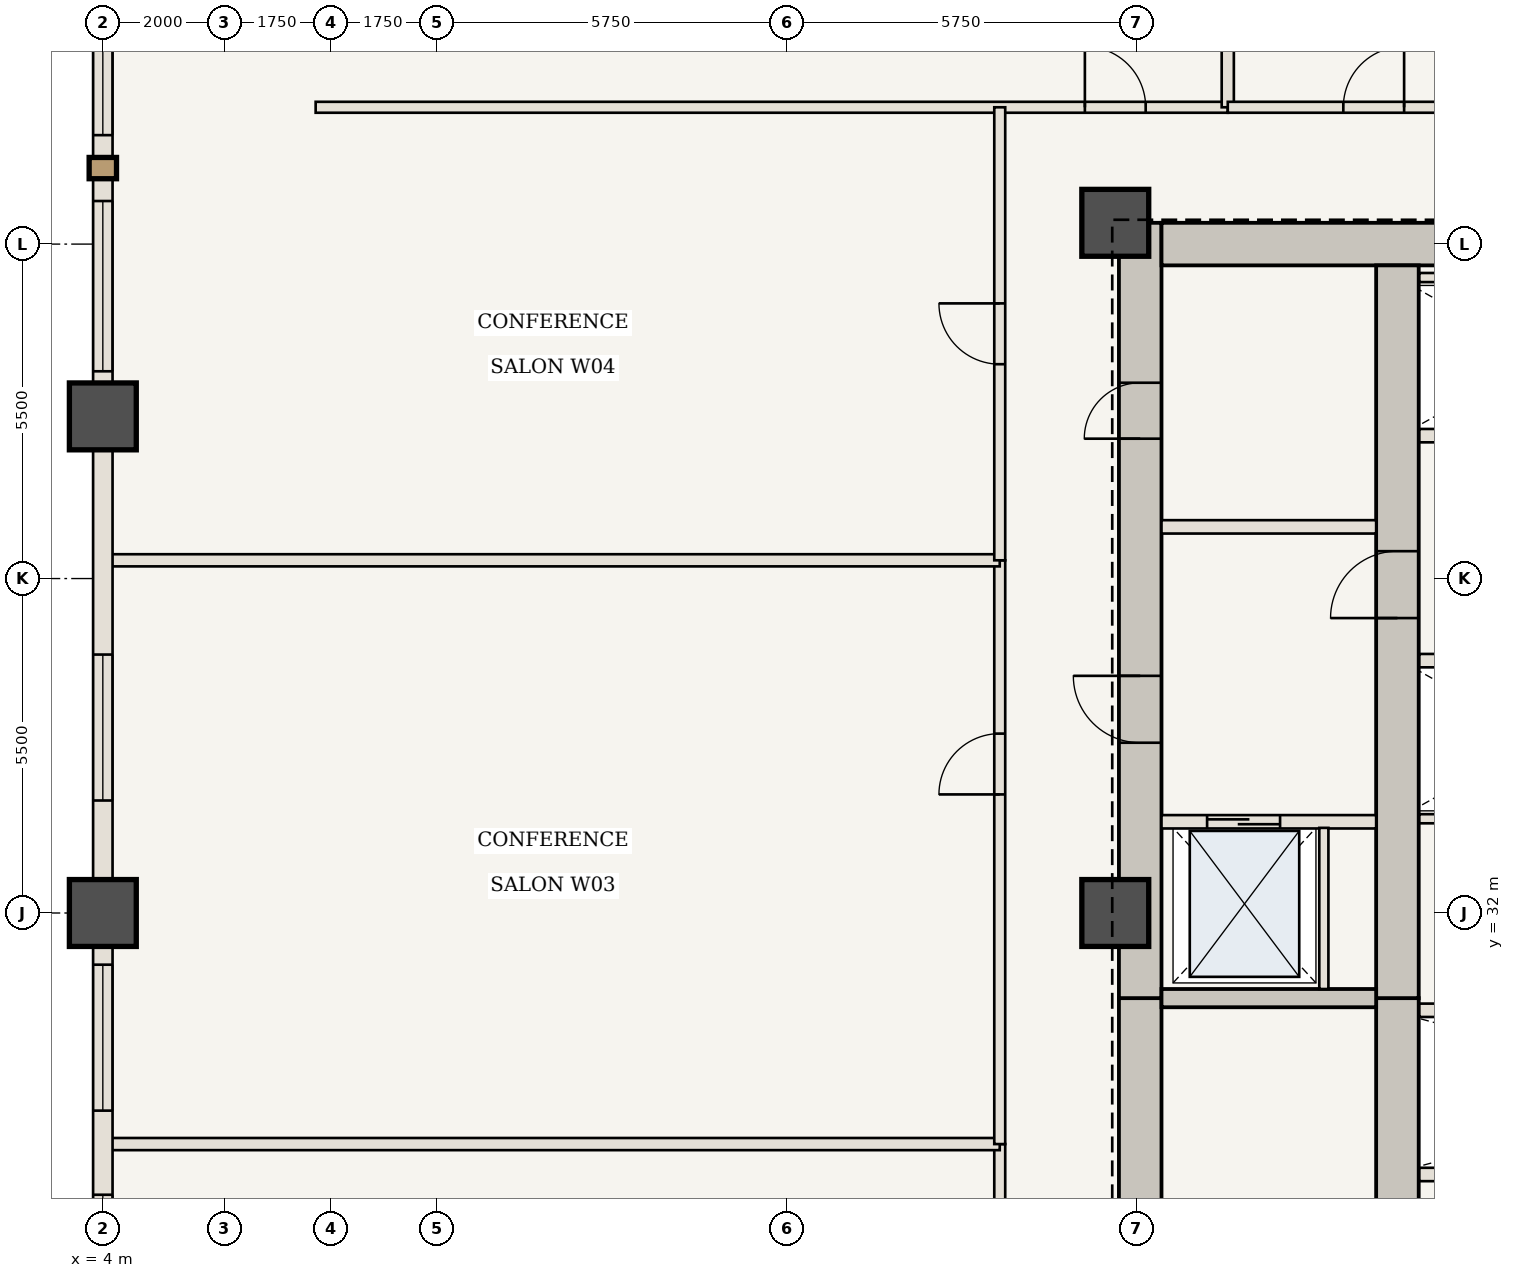
"""IFC4 building model, lengths in metres.
Left out: names, types, materials, properties, quantities, classifications, styles, units other than length and angle.
Written with IfcOpenShell. Run it as: python <this file> out.ifc"""

import sys

from ifc_helpers import new_model, si_unit, direction, frame, frame_2d, origin, origin_2d, place, context, subcontext, project, spatial, rectangle, extrude, element, fill, save


model = new_model("IFC4")
c1 = context("Model", 3, precision=1e-05, world=origin(), true_north=direction((0.0, 1.0)))
c2 = subcontext(c1, "Body", "Model", "MODEL_VIEW")
j1 = project(units=[si_unit("LENGTHUNIT", "METRE"), si_unit("PLANEANGLEUNIT", "RADIAN")], contexts=[c1])
p1 = place(None, origin())
s1 = spatial("IfcSite", under=j1, at=p1, CompositionType="ELEMENT")
p2 = place(p1, origin())
s2 = spatial("IfcBuilding", under=s1, at=p2, CompositionType="ELEMENT")
p3 = place(p2, frame((0.0, 0.0, 82.25)))
s3 = spatial("IfcBuildingStorey", under=s2, at=p3, CompositionType="ELEMENT", Elevation=82.25)
p4 = place(p3, frame((21.06, 20.6, 0.0), z_axis=(0.0, 0.0, 1.0), x_axis=(0.0, 1.0, 0.0)))
e1 = element("IfcWall", 1, at=p4, inside=s3, PredefinedType="SHEAR", context=c2, shape_type="SweptSolid", body=[
    extrude(rectangle(XDim=10.0, YDim=0.7, at=frame_2d((5.0, 0.0))), origin(), (0.0, 0.0, 1.0), 3.5),
])
p5 = place(p4, frame((1.15, 0.0, 0.0)))
e2 = element("IfcOpeningElement", 2, at=p5, cuts=e1, PredefinedType="OPENING", context=c2, shape_type="SweptSolid", body=[
    extrude(rectangle(XDim=1.15, YDim=2.15, at=frame_2d((0.575, 1.075))), frame((0.0, 0.36, 0.0), z_axis=(0.0, -1.0, 0.0), x_axis=(1.0, 0.0, 0.0)), (0.0, 0.0, 1.0), 0.72),
])
p6 = place(p3, frame((21.06, 30.6, 0.0), z_axis=(0.0, 0.0, 1.0), x_axis=(0.0, 1.0, 0.0)))
e3 = element("IfcWall", 3, at=p6, inside=s3, PredefinedType="SHEAR", context=c2, shape_type="SweptSolid", body=[
    extrude(rectangle(XDim=12.75, YDim=0.7, at=frame_2d((6.375, 0.0))), origin(), (0.0, 0.0, 1.0), 3.5),
])
p7 = place(p6, frame((4.2, 0.0, 0.0)))
e4 = element("IfcOpeningElement", 4, at=p7, cuts=e3, PredefinedType="OPENING", context=c2, shape_type="SweptSolid", body=[
    extrude(rectangle(XDim=1.1, YDim=2.15, at=frame_2d((0.55, 1.075))), frame((0.0, 0.36, 0.0), z_axis=(0.0, -1.0, 0.0), x_axis=(1.0, 0.0, 0.0)), (0.0, 0.0, 1.0), 0.72),
])
p8 = place(p6, frame((9.2, 0.0, 0.0)))
e5 = element("IfcOpeningElement", 5, at=p8, cuts=e3, PredefinedType="OPENING", context=c2, shape_type="SweptSolid", body=[
    extrude(rectangle(XDim=0.92, YDim=2.1, at=frame_2d((0.46, 1.05))), frame((0.0, 0.36, 0.0), z_axis=(0.0, -1.0, 0.0), x_axis=(1.0, 0.0, 0.0)), (0.0, 0.0, 1.0), 0.72),
])
p9 = place(p3, frame((21.41, 43.0, 0.0), z_axis=(0.0, 0.0, 1.0), x_axis=(1.0, 0.0, 0.0)))
e6 = element("IfcWall", 6, at=p9, inside=s3, PredefinedType="SHEAR", context=c2, shape_type="SweptSolid", body=[
    extrude(rectangle(XDim=8.24, YDim=0.7, at=frame_2d((4.12, 0.0))), origin(), (0.0, 0.0, 1.0), 3.5),
])
p10 = place(p3, frame((25.29, 21.3, 0.0), z_axis=(0.0, 0.0, 1.0), x_axis=(0.0, 1.0, 0.0)))
e7 = element("IfcWall", 7, at=p10, inside=s3, PredefinedType="SHEAR", context=c2, shape_type="SweptSolid", body=[
    extrude(rectangle(XDim=9.3, YDim=0.7, at=frame_2d((4.65, 0.0))), origin(), (0.0, 0.0, 1.0), 3.5),
])
p11 = place(p3, frame((25.29, 30.6, 0.0), z_axis=(0.0, 0.0, 1.0), x_axis=(0.0, 1.0, 0.0)))
e8 = element("IfcWall", 8, at=p11, inside=s3, PredefinedType="SHEAR", context=c2, shape_type="SweptSolid", body=[
    extrude(rectangle(XDim=12.05, YDim=0.7, at=frame_2d((6.025, 0.0))), origin(), (0.0, 0.0, 1.0), 3.5),
])
p12 = place(p11, frame((6.25, 0.0, 0.0)))
e9 = element("IfcOpeningElement", 9, at=p12, cuts=e8, PredefinedType="OPENING", context=c2, shape_type="SweptSolid", body=[
    extrude(rectangle(XDim=1.1, YDim=2.15, at=frame_2d((0.55, 1.075))), frame((0.0, 0.36, 0.0), z_axis=(0.0, -1.0, 0.0), x_axis=(1.0, 0.0, 0.0)), (0.0, 0.0, 1.0), 0.72),
])
for number, where, z_axis, x_axis in (
    (10, (20.65, 43.35, 0.0), (0.0, 0.0, 1.0), (1.0, 0.0, 0.0)),
    (11, (20.65, 32.0, 0.0), (0.0, 0.0, 1.0), (1.0, 0.0, 0.0)),
    (12, (4.0, 32.0, 0.0), (0.0, 0.0, 1.0), (1.0, 0.0, 0.0)),
    (13, (4.0, 40.167, 0.0), (0.0, 0.0, 1.0), (1.0, 0.0, 0.0)),
):
    element("IfcColumn", number, at=place(p3, frame(where, z_axis=z_axis, x_axis=x_axis)), inside=s3, PredefinedType="COLUMN", context=c2, shape_type="SweptSolid", body=[
        extrude(rectangle(XDim=1.1, YDim=1.1, at=origin_2d()), origin(), (0.0, 0.0, 1.0), 3.5),
    ])
p13 = place(p3, frame((21.41, 30.6, 0.0), z_axis=(0.0, 0.0, 1.0), x_axis=(1.0, 0.0, 0.0)))
e14 = element("IfcWall", 14, at=p13, inside=s3, PredefinedType="SHEAR", context=c2, shape_type="SweptSolid", body=[
    extrude(rectangle(XDim=3.53, YDim=0.3, at=frame_2d((1.765, 0.0))), origin(), (0.0, 0.0, 1.0), 3.32),
])
p14 = place(p3, frame((21.41, 33.5, 0.0), z_axis=(0.0, 0.0, 1.0), x_axis=(1.0, 0.0, 0.0)))
e15 = element("IfcWall", 15, at=p14, inside=s3, PredefinedType="STANDARD", context=c2, shape_type="SweptSolid", body=[
    extrude(rectangle(XDim=3.53, YDim=0.22, at=frame_2d((1.765, 0.0))), origin(), (0.0, 0.0, 1.0), 3.32),
])
p15 = place(p14, frame((0.75, 0.0, 0.0)))
e16 = element("IfcOpeningElement", 16, at=p15, cuts=e15, PredefinedType="OPENING", context=c2, shape_type="SweptSolid", body=[
    extrude(rectangle(XDim=1.2, YDim=2.2, at=frame_2d((0.6, 1.1))), frame((0.0, 0.12, 0.0), z_axis=(0.0, -1.0, 0.0), x_axis=(1.0, 0.0, 0.0)), (0.0, 0.0, 1.0), 0.24),
])
p16 = place(p3, frame((24.08, 30.75, 0.0), z_axis=(0.0, 0.0, 1.0), x_axis=(0.0, 1.0, 0.0)))
e17 = element("IfcWall", 17, at=p16, inside=s3, PredefinedType="STANDARD", context=c2, shape_type="SweptSolid", body=[
    extrude(rectangle(XDim=2.65, YDim=0.15, at=frame_2d((1.325, 0.0))), origin(), (0.0, 0.0, 1.0), 3.32),
])
p17 = place(p3, frame((21.41, 38.35, 0.0), z_axis=(0.0, 0.0, 1.0), x_axis=(1.0, 0.0, 0.0)))
e18 = element("IfcWall", 18, at=p17, inside=s3, PredefinedType="STANDARD", context=c2, shape_type="SweptSolid", body=[
    extrude(rectangle(XDim=3.53, YDim=0.22, at=frame_2d((1.765, 0.0))), origin(), (0.0, 0.0, 1.0), 3.32),
])
for number, where, z_axis, x_axis in (
    (19, (25.65, 27.7, 0.0), (0.0, 0.0, 1.0), (1.0, 0.0, 0.0)),
    (20, (25.65, 30.4, 0.0), (0.0, 0.0, 1.0), (1.0, 0.0, 0.0)),
):
    element("IfcWall", number, at=place(p3, frame(where, z_axis=z_axis, x_axis=x_axis)), inside=s3, PredefinedType="STANDARD", context=c2, shape_type="SweptSolid", body=[
        extrude(rectangle(XDim=9.25, YDim=0.22, at=frame_2d((4.625, 0.0))), origin(), (0.0, 0.0, 1.0), 3.32),
    ])
p18 = place(p3, frame((25.65, 36.15, 0.0), z_axis=(0.0, 0.0, 1.0), x_axis=(1.0, 0.0, 0.0)))
e21 = element("IfcWall", 21, at=p18, inside=s3, PredefinedType="STANDARD", context=c2, shape_type="SweptSolid", body=[
    extrude(rectangle(XDim=4.3, YDim=0.22, at=frame_2d((2.15, 0.0))), origin(), (0.0, 0.0, 1.0), 3.32),
])
p19 = place(p3, frame((25.65, 33.55, 0.0), z_axis=(0.0, 0.0, 1.0), x_axis=(1.0, 0.0, 0.0)))
e22 = element("IfcWall", 22, at=p19, inside=s3, PredefinedType="STANDARD", context=c2, shape_type="SweptSolid", body=[
    extrude(rectangle(XDim=4.2, YDim=0.15, at=frame_2d((2.1, 0.0))), origin(), (0.0, 0.0, 1.0), 3.32),
])
p20 = place(p3, frame((25.65, 39.85, 0.0), z_axis=(0.0, 0.0, 1.0), x_axis=(1.0, 0.0, 0.0)))
e23 = element("IfcWall", 23, at=p20, inside=s3, PredefinedType="STANDARD", context=c2, shape_type="SweptSolid", body=[
    extrude(rectangle(XDim=4.3, YDim=0.22, at=frame_2d((2.15, 0.0))), origin(), (0.0, 0.0, 1.0), 3.32),
])
p21 = place(p3, frame((25.65, 42.45, 0.0), z_axis=(0.0, 0.0, 1.0), x_axis=(1.0, 0.0, 0.0)))
e24 = element("IfcWall", 24, at=p21, inside=s3, PredefinedType="STANDARD", context=c2, shape_type="SweptSolid", body=[
    extrude(rectangle(XDim=4.2, YDim=0.15, at=frame_2d((2.1, 0.0))), origin(), (0.0, 0.0, 1.0), 3.32),
])
p22 = place(p3, frame((7.5, 45.25, 0.0), z_axis=(0.0, 0.0, 1.0), x_axis=(1.0, 0.0, 0.0)))
e25 = element("IfcWall", 25, at=p22, inside=s3, PredefinedType="STANDARD", context=c2, shape_type="SweptSolid", body=[
    extrude(rectangle(XDim=15.0, YDim=0.18, at=frame_2d((7.5, 0.0))), origin(), (0.0, 0.0, 1.0), 3.32),
])
p23 = place(p22, frame((12.65, 0.0, 0.0)))
e26 = element("IfcOpeningElement", 26, at=p23, cuts=e25, PredefinedType="OPENING", context=c2, shape_type="SweptSolid", body=[
    extrude(rectangle(XDim=1.0, YDim=2.15, at=frame_2d((0.5, 1.075))), frame((0.0, 0.1, 0.0), z_axis=(0.0, -1.0, 0.0), x_axis=(1.0, 0.0, 0.0)), (0.0, 0.0, 1.0), 0.2),
])
p24 = place(p3, frame((22.5, 45.25, 0.0), z_axis=(0.0, 0.0, 1.0), x_axis=(0.0, 1.0, 0.0)))
e27 = element("IfcWall", 27, at=p24, inside=s3, PredefinedType="STANDARD", context=c2, shape_type="SweptSolid", body=[
    extrude(rectangle(XDim=14.69, YDim=0.2, at=frame_2d((7.345, 0.0))), origin(), (0.0, 0.0, 1.0), 3.32),
])
p25 = place(p3, frame((22.5, 45.25, 0.0), z_axis=(0.0, 0.0, 1.0), x_axis=(1.0, 0.0, 0.0)))
e28 = element("IfcWall", 28, at=p25, inside=s3, PredefinedType="STANDARD", context=c2, shape_type="SweptSolid", body=[
    extrude(rectangle(XDim=4.8, YDim=0.18, at=frame_2d((2.4, 0.0))), origin(), (0.0, 0.0, 1.0), 3.32),
])
p26 = place(p25, frame((1.9, 0.0, 0.0)))
e29 = element("IfcOpeningElement", 29, at=p26, cuts=e28, PredefinedType="OPENING", context=c2, shape_type="SweptSolid", body=[
    extrude(rectangle(XDim=1.0, YDim=2.15, at=frame_2d((0.5, 1.075))), frame((0.0, 0.1, 0.0), z_axis=(0.0, -1.0, 0.0), x_axis=(1.0, 0.0, 0.0)), (0.0, 0.0, 1.0), 0.2),
])
p27 = place(p3, frame((18.75, 23.5, 0.0), z_axis=(0.0, 0.0, 1.0), x_axis=(0.0, 1.0, 0.0)))
e30 = element("IfcWall", 30, at=p27, inside=s3, PredefinedType="STANDARD", context=c2, shape_type="SweptSolid", body=[
    extrude(rectangle(XDim=4.7, YDim=0.18, at=frame_2d((2.35, 0.0))), origin(), (0.0, 0.0, 1.0), 3.32),
])
p28 = place(p27, frame((1.85, 0.0, 0.0)))
e31 = element("IfcOpeningElement", 31, at=p28, cuts=e30, PredefinedType="OPENING", context=c2, shape_type="SweptSolid", body=[
    extrude(rectangle(XDim=1.0, YDim=2.15, at=frame_2d((0.5, 1.075))), frame((0.0, 0.1, 0.0), z_axis=(0.0, -1.0, 0.0), x_axis=(1.0, 0.0, 0.0)), (0.0, 0.0, 1.0), 0.2),
])
p29 = place(p3, frame((4.06, 28.2, 0.0), z_axis=(0.0, 0.0, 1.0), x_axis=(1.0, 0.0, 0.0)))
e32 = element("IfcWall", 32, at=p29, inside=s3, PredefinedType="STANDARD", context=c2, shape_type="SweptSolid", body=[
    extrude(rectangle(XDim=14.69, YDim=0.2, at=frame_2d((7.345, 0.0))), origin(), (0.0, 0.0, 1.0), 3.32),
])
p30 = place(p3, frame((18.75, 28.2, 0.0), z_axis=(0.0, 0.0, 1.0), x_axis=(0.0, 1.0, 0.0)))
e33 = element("IfcWall", 33, at=p30, inside=s3, PredefinedType="STANDARD", context=c2, shape_type="SweptSolid", body=[
    extrude(rectangle(XDim=9.6, YDim=0.18, at=frame_2d((4.8, 0.0))), origin(), (0.0, 0.0, 1.0), 3.32),
])
p31 = place(p30, frame((5.75, 0.0, 0.0)))
e34 = element("IfcOpeningElement", 34, at=p31, cuts=e33, PredefinedType="OPENING", context=c2, shape_type="SweptSolid", body=[
    extrude(rectangle(XDim=1.0, YDim=2.15, at=frame_2d((0.5, 1.075))), frame((0.0, 0.1, 0.0), z_axis=(0.0, -1.0, 0.0), x_axis=(1.0, 0.0, 0.0)), (0.0, 0.0, 1.0), 0.2),
])
p32 = place(p3, frame((4.06, 37.8, 0.0), z_axis=(0.0, 0.0, 1.0), x_axis=(1.0, 0.0, 0.0)))
e35 = element("IfcWall", 35, at=p32, inside=s3, PredefinedType="STANDARD", context=c2, shape_type="SweptSolid", body=[
    extrude(rectangle(XDim=14.69, YDim=0.2, at=frame_2d((7.345, 0.0))), origin(), (0.0, 0.0, 1.0), 3.32),
])
p33 = place(p3, frame((18.75, 37.8, 0.0), z_axis=(0.0, 0.0, 1.0), x_axis=(0.0, 1.0, 0.0)))
e36 = element("IfcWall", 36, at=p33, inside=s3, PredefinedType="STANDARD", context=c2, shape_type="SweptSolid", body=[
    extrude(rectangle(XDim=7.45, YDim=0.18, at=frame_2d((3.725, 0.0))), origin(), (0.0, 0.0, 1.0), 3.32),
])
p34 = place(p33, frame((3.225, 0.0, 0.0)))
e37 = element("IfcOpeningElement", 37, at=p34, cuts=e36, PredefinedType="OPENING", context=c2, shape_type="SweptSolid", body=[
    extrude(rectangle(XDim=1.0, YDim=2.15, at=frame_2d((0.5, 1.075))), frame((0.0, 0.1, 0.0), z_axis=(0.0, -1.0, 0.0), x_axis=(1.0, 0.0, 0.0)), (0.0, 0.0, 1.0), 0.2),
])
p35 = place(p3, frame((4.0, 23.833, 0.0), z_axis=(0.0, 0.0, 1.0), x_axis=(0.0, 1.0, 0.0)))
e38 = element("IfcWall", 38, at=p35, inside=s3, PredefinedType="USERDEFINED", context=c2, shape_type="SweptSolid", body=[
    extrude(rectangle(XDim=8.167, YDim=0.32, at=frame_2d((4.083, 0.0))), origin(), (0.0, 0.0, 1.0), 2.52),
])
p36 = place(p35, frame((1.133, 0.0, 0.85)))
e39 = element("IfcOpeningElement", 39, at=p36, cuts=e38, PredefinedType="OPENING", context=c2, shape_type="SweptSolid", body=[
    extrude(rectangle(XDim=2.4, YDim=1.47, at=frame_2d((1.2, 0.735))), frame((0.0, 0.17, 0.0), z_axis=(0.0, -1.0, 0.0), x_axis=(1.0, 0.0, 0.0)), (0.0, 0.0, 1.0), 0.34),
])
p37 = place(p35, frame((4.917, 0.0, 0.85)))
e40 = element("IfcOpeningElement", 40, at=p37, cuts=e38, PredefinedType="OPENING", context=c2, shape_type="SweptSolid", body=[
    extrude(rectangle(XDim=2.4, YDim=1.47, at=frame_2d((1.2, 0.735))), frame((0.0, 0.17, 0.0), z_axis=(0.0, -1.0, 0.0), x_axis=(1.0, 0.0, 0.0)), (0.0, 0.0, 1.0), 0.34),
])
p38 = place(p3, frame((4.0, 32.0, 0.0), z_axis=(0.0, 0.0, 1.0), x_axis=(0.0, 1.0, 0.0)))
e41 = element("IfcWall", 41, at=p38, inside=s3, PredefinedType="USERDEFINED", context=c2, shape_type="SweptSolid", body=[
    extrude(rectangle(XDim=8.167, YDim=0.32, at=frame_2d((4.083, 0.0))), origin(), (0.0, 0.0, 1.0), 2.52),
])
p39 = place(p38, frame((1.85, 0.0, 0.85)))
e42 = element("IfcOpeningElement", 42, at=p39, cuts=e41, PredefinedType="OPENING", context=c2, shape_type="SweptSolid", body=[
    extrude(rectangle(XDim=2.4, YDim=1.47, at=frame_2d((1.2, 0.735))), frame((0.0, 0.17, 0.0), z_axis=(0.0, -1.0, 0.0), x_axis=(1.0, 0.0, 0.0)), (0.0, 0.0, 1.0), 0.34),
])
p40 = place(p3, frame((4.0, 40.167, 0.0), z_axis=(0.0, 0.0, 1.0), x_axis=(0.0, 1.0, 0.0)))
e43 = element("IfcWall", 43, at=p40, inside=s3, PredefinedType="USERDEFINED", context=c2, shape_type="SweptSolid", body=[
    extrude(rectangle(XDim=8.167, YDim=0.32, at=frame_2d((4.083, 0.0))), origin(), (0.0, 0.0, 1.0), 2.52),
])
p41 = place(p40, frame((0.742, 0.0, 0.85)))
e44 = element("IfcOpeningElement", 44, at=p41, cuts=e43, PredefinedType="OPENING", context=c2, shape_type="SweptSolid", body=[
    extrude(rectangle(XDim=2.8, YDim=1.47, at=frame_2d((1.4, 0.735))), frame((0.0, 0.17, 0.0), z_axis=(0.0, -1.0, 0.0), x_axis=(1.0, 0.0, 0.0)), (0.0, 0.0, 1.0), 0.34),
])
p42 = place(p40, frame((4.625, 0.0, 0.85)))
e45 = element("IfcOpeningElement", 45, at=p42, cuts=e43, PredefinedType="OPENING", context=c2, shape_type="SweptSolid", body=[
    extrude(rectangle(XDim=2.8, YDim=1.47, at=frame_2d((1.4, 0.735))), frame((0.0, 0.17, 0.0), z_axis=(0.0, -1.0, 0.0), x_axis=(1.0, 0.0, 0.0)), (0.0, 0.0, 1.0), 0.34),
])
p43 = place(p7, origin())
e46 = element("IfcDoor", 46, at=p43, inside=s3, OperationType="SINGLE_SWING_RIGHT", PredefinedType="DOOR", context=c2, shape_type="SweptSolid", body=[
    extrude(rectangle(XDim=1.1, YDim=2.15, at=frame_2d((0.55, 1.075))), frame((0.0, 0.025, 0.0), z_axis=(0.0, -1.0, 0.0), x_axis=(1.0, 0.0, 0.0)), (0.0, 0.0, 1.0), 0.05),
])
fill(e4, e46)
p44 = place(p12, origin())
e47 = element("IfcDoor", 47, at=p44, inside=s3, OperationType="SINGLE_SWING_LEFT", PredefinedType="DOOR", context=c2, shape_type="SweptSolid", body=[
    extrude(rectangle(XDim=1.1, YDim=2.15, at=frame_2d((0.55, 1.075))), frame((0.0, 0.025, 0.0), z_axis=(0.0, -1.0, 0.0), x_axis=(1.0, 0.0, 0.0)), (0.0, 0.0, 1.0), 0.05),
])
fill(e9, e47)
p45 = place(p8, origin())
e48 = element("IfcDoor", 48, at=p45, inside=s3, OperationType="SINGLE_SWING_LEFT", PredefinedType="DOOR", context=c2, shape_type="SweptSolid", body=[
    extrude(rectangle(XDim=0.92, YDim=2.1, at=frame_2d((0.46, 1.05))), frame((0.0, 0.025, 0.0), z_axis=(0.0, -1.0, 0.0), x_axis=(1.0, 0.0, 0.0)), (0.0, 0.0, 1.0), 0.05),
])
fill(e5, e48)
p46 = place(p15, origin())
e49 = element("IfcDoor", 49, at=p46, inside=s3, OperationType="DOUBLE_DOOR_SLIDING", PredefinedType="DOOR", context=c2, shape_type="SweptSolid", body=[
    extrude(rectangle(XDim=1.2, YDim=2.2, at=frame_2d((0.6, 1.1))), frame((0.0, 0.025, 0.0), z_axis=(0.0, -1.0, 0.0), x_axis=(1.0, 0.0, 0.0)), (0.0, 0.0, 1.0), 0.05),
])
fill(e16, e49)
p47 = place(p23, origin())
e50 = element("IfcDoor", 50, at=p47, inside=s3, OperationType="SINGLE_SWING_LEFT", PredefinedType="DOOR", context=c2, shape_type="SweptSolid", body=[
    extrude(rectangle(XDim=1.0, YDim=2.15, at=frame_2d((0.5, 1.075))), frame((0.0, 0.025, 0.0), z_axis=(0.0, -1.0, 0.0), x_axis=(1.0, 0.0, 0.0)), (0.0, 0.0, 1.0), 0.05),
])
fill(e26, e50)
p48 = place(p26, origin())
e51 = element("IfcDoor", 51, at=p48, inside=s3, OperationType="SINGLE_SWING_RIGHT", PredefinedType="DOOR", context=c2, shape_type="SweptSolid", body=[
    extrude(rectangle(XDim=1.0, YDim=2.15, at=frame_2d((0.5, 1.075))), frame((0.0, 0.025, 0.0), z_axis=(0.0, -1.0, 0.0), x_axis=(1.0, 0.0, 0.0)), (0.0, 0.0, 1.0), 0.05),
])
fill(e29, e51)
p49 = place(p31, origin())
e52 = element("IfcDoor", 52, at=p49, inside=s3, OperationType="SINGLE_SWING_LEFT", PredefinedType="DOOR", context=c2, shape_type="SweptSolid", body=[
    extrude(rectangle(XDim=1.0, YDim=2.15, at=frame_2d((0.5, 1.075))), frame((0.0, 0.025, 0.0), z_axis=(0.0, -1.0, 0.0), x_axis=(1.0, 0.0, 0.0)), (0.0, 0.0, 1.0), 0.05),
])
fill(e34, e52)
p50 = place(p34, origin())
e53 = element("IfcDoor", 53, at=p50, inside=s3, OperationType="SINGLE_SWING_RIGHT", PredefinedType="DOOR", context=c2, shape_type="SweptSolid", body=[
    extrude(rectangle(XDim=1.0, YDim=2.15, at=frame_2d((0.5, 1.075))), frame((0.0, 0.025, 0.0), z_axis=(0.0, -1.0, 0.0), x_axis=(1.0, 0.0, 0.0)), (0.0, 0.0, 1.0), 0.05),
])
fill(e37, e53)
p51 = place(p36, origin())
e54 = element("IfcWindow", 54, at=p51, inside=s3, PartitioningType="SINGLE_PANEL", PredefinedType="WINDOW", context=c2, shape_type="SweptSolid", body=[
    extrude(rectangle(XDim=2.4, YDim=1.47, at=frame_2d((1.2, 0.735))), frame((0.0, 0.03, 0.0), z_axis=(0.0, -1.0, 0.0), x_axis=(1.0, 0.0, 0.0)), (0.0, 0.0, 1.0), 0.06),
])
fill(e39, e54)
p52 = place(p37, origin())
e55 = element("IfcWindow", 55, at=p52, inside=s3, PartitioningType="SINGLE_PANEL", PredefinedType="WINDOW", context=c2, shape_type="SweptSolid", body=[
    extrude(rectangle(XDim=2.4, YDim=1.47, at=frame_2d((1.2, 0.735))), frame((0.0, 0.03, 0.0), z_axis=(0.0, -1.0, 0.0), x_axis=(1.0, 0.0, 0.0)), (0.0, 0.0, 1.0), 0.06),
])
fill(e40, e55)
p53 = place(p39, origin())
e56 = element("IfcWindow", 56, at=p53, inside=s3, PartitioningType="SINGLE_PANEL", PredefinedType="WINDOW", context=c2, shape_type="SweptSolid", body=[
    extrude(rectangle(XDim=2.4, YDim=1.47, at=frame_2d((1.2, 0.735))), frame((0.0, 0.03, 0.0), z_axis=(0.0, -1.0, 0.0), x_axis=(1.0, 0.0, 0.0)), (0.0, 0.0, 1.0), 0.06),
])
fill(e42, e56)
p54 = place(p41, origin())
e57 = element("IfcWindow", 57, at=p54, inside=s3, PartitioningType="SINGLE_PANEL", PredefinedType="WINDOW", context=c2, shape_type="SweptSolid", body=[
    extrude(rectangle(XDim=2.8, YDim=1.47, at=frame_2d((1.4, 0.735))), frame((0.0, 0.03, 0.0), z_axis=(0.0, -1.0, 0.0), x_axis=(1.0, 0.0, 0.0)), (0.0, 0.0, 1.0), 0.06),
])
fill(e44, e57)
p55 = place(p42, origin())
e58 = element("IfcWindow", 58, at=p55, inside=s3, PartitioningType="SINGLE_PANEL", PredefinedType="WINDOW", context=c2, shape_type="SweptSolid", body=[
    extrude(rectangle(XDim=2.8, YDim=1.47, at=frame_2d((1.4, 0.735))), frame((0.0, 0.03, 0.0), z_axis=(0.0, -1.0, 0.0), x_axis=(1.0, 0.0, 0.0)), (0.0, 0.0, 1.0), 0.06),
])
fill(e45, e58)
save(model, sys.argv[1])
